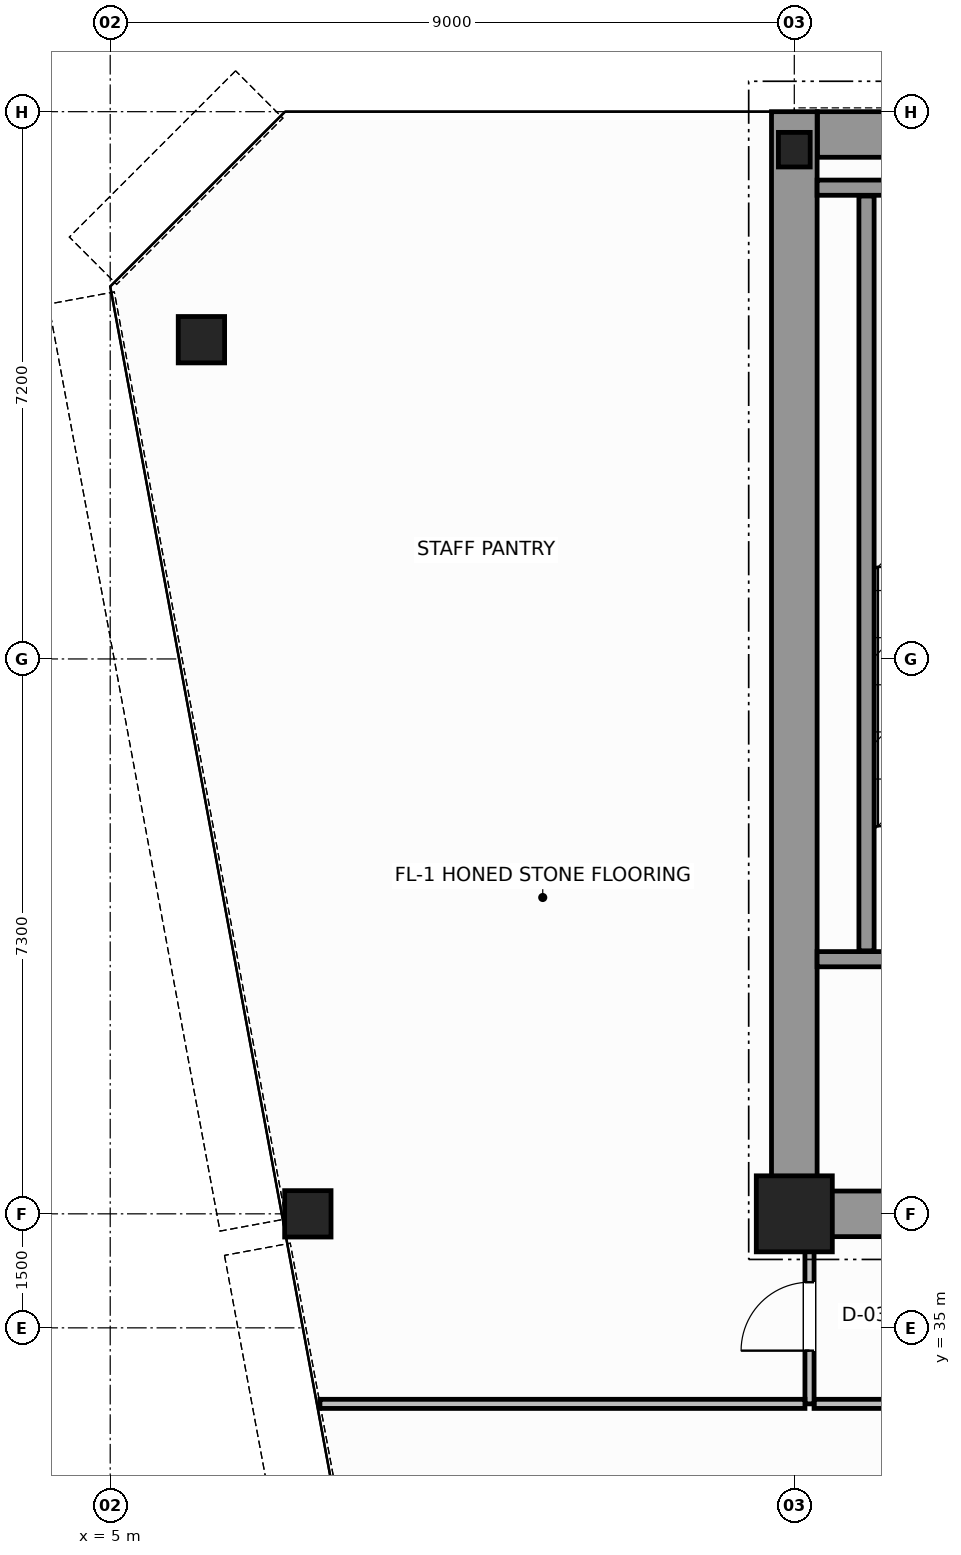
"""IFC4 building model, lengths in metres.
Left out: names, types, materials, properties, quantities, classifications, styles, units other than length and angle.
Written with IfcOpenShell. Run it as: python <this file> out.ifc"""

import sys

from ifc_helpers import new_model, si_unit, direction, frame, frame_2d, origin, origin_2d, place, context, subcontext, project, spatial, rectangle, hollow_circle, i_section, extrude, source, transform, mapped, element, fill, save


model = new_model("IFC4")
c1 = context("Model", 3, precision=1e-05, world=origin(), true_north=direction((0.0, 1.0)))
c2 = subcontext(c1, "Body", "Model", "MODEL_VIEW")
j1 = project(units=[si_unit("LENGTHUNIT", "METRE"), si_unit("PLANEANGLEUNIT", "RADIAN")], contexts=[c1])
p1 = place(None, origin())
s1 = spatial("IfcSite", under=j1, at=p1, CompositionType="ELEMENT")
p2 = place(p1, origin())
s2 = spatial("IfcBuilding", under=s1, at=p2, CompositionType="ELEMENT")
p3 = place(p2, frame((0.0, 0.0, 227.0)))
s3 = spatial("IfcBuildingStorey", under=s2, at=p3, CompositionType="ELEMENT", Elevation=227.0)
m1 = source(origin(), c2, "Body", "SweptSolid", [
    extrude(rectangle(XDim=1.0, YDim=1.0, at=origin_2d()), origin(), (0.0, 0.0, 1.0), 3.8),
])
p4 = place(p3, frame((14.0, 36.5, 0.0), z_axis=(0.0, 0.0, 1.0), x_axis=(1.0, 0.0, 0.0)))
e1 = element("IfcColumn", 1, at=p4, inside=s3, PredefinedType="COLUMN", context=c2, shape_type="MappedRepresentation", body=[
    mapped(m1, transform((0.0, 0.0, 0.0), scale=1.0)),
])
m2 = source(origin(), c2, "Body", "SweptSolid", [
    extrude(i_section(OverallWidth=0.418, OverallDepth=0.455, WebThickness=0.042, FlangeThickness=0.058, FilletRadius=0.015, at=origin_2d()), origin(), (0.0, 0.0, 1.0), 3.8),
])
p5 = place(p3, frame((14.0, 50.5, 0.0), z_axis=(0.0, 0.0, 1.0), x_axis=(1.0, 0.0, 0.0)))
e2 = element("IfcColumn", 2, at=p5, inside=s3, PredefinedType="COLUMN", context=c2, shape_type="MappedRepresentation", body=[
    mapped(m2, transform((0.0, 0.0, 0.0), scale=1.0)),
])
m3 = source(origin(), c2, "Body", "SweptSolid", [
    extrude(hollow_circle(Radius=0.305, WallThickness=0.03, at=origin_2d()), origin(), (0.0, 0.0, 1.0), 3.8),
])
for number, where, z_axis, x_axis in (
    (3, (6.2, 48.0, 0.0), (0.0, 0.0, 1.0), (1.0, 0.0, 0.0)),
    (4, (7.6, 36.5, 0.0), (0.0, 0.0, 1.0), (1.0, 0.0, 0.0)),
):
    element("IfcColumn", number, at=place(p3, frame(where, z_axis=z_axis, x_axis=x_axis)), inside=s3, PredefinedType="COLUMN", context=c2, shape_type="MappedRepresentation", body=[
        mapped(m3, transform((0.0, 0.0, 0.0), scale=1.0)),
    ])
p6 = place(p3, frame((14.304, 50.7, 0.0), z_axis=(0.0, 0.0, 1.0), x_axis=(1.0, 0.0, 0.0)))
e5 = element("IfcWall", 5, at=p6, inside=s3, PredefinedType="SHEAR", context=c2, shape_type="SweptSolid", body=[
    extrude(rectangle(XDim=19.694, YDim=0.6, at=frame_2d((9.847, 0.0))), origin(), (0.0, 0.0, 1.0), 3.8),
])
p7 = place(p3, frame((14.0, 36.5, 0.0), z_axis=(0.0, 0.0, 1.0), x_axis=(0.0, 1.0, 0.0)))
e6 = element("IfcWall", 6, at=p7, inside=s3, PredefinedType="SHEAR", context=c2, shape_type="SweptSolid", body=[
    extrude(rectangle(XDim=14.5, YDim=0.6, at=frame_2d((7.25, 0.0))), origin(), (0.0, 0.0, 1.0), 3.8),
])
p8 = place(p3, frame((14.32, 36.5, 0.0), z_axis=(0.0, 0.0, 1.0), x_axis=(1.0, 0.0, 0.0)))
e7 = element("IfcWall", 7, at=p8, inside=s3, PredefinedType="SHEAR", context=c2, shape_type="SweptSolid", body=[
    extrude(rectangle(XDim=3.88, YDim=0.6, at=frame_2d((1.94, 0.0))), origin(), (0.0, 0.0, 1.0), 2.58),
])
p9 = place(p3, frame((14.3, 39.85, 0.0), z_axis=(0.0, 0.0, 1.0), x_axis=(1.0, 0.0, 0.0)))
e8 = element("IfcWall", 8, at=p9, inside=s3, PredefinedType="SOLIDWALL", context=c2, shape_type="SweptSolid", body=[
    extrude(rectangle(XDim=4.3, YDim=0.2, at=frame_2d((2.15, 0.0))), origin(), (0.0, 0.0, 1.0), 3.8),
])
p10 = place(p9, frame((1.875, 0.0, 0.0)))
e9 = element("IfcOpeningElement", 9, at=p10, cuts=e8, PredefinedType="OPENING", context=c2, shape_type="SweptSolid", body=[
    extrude(rectangle(XDim=1.1, YDim=2.15, at=frame_2d((0.55, 1.075))), frame((0.0, 0.11, 0.0), z_axis=(0.0, -1.0, 0.0), x_axis=(1.0, 0.0, 0.0)), (0.0, 0.0, 1.0), 0.22),
])
p11 = place(p3, frame((14.3, 50.0, 0.0), z_axis=(0.0, 0.0, 1.0), x_axis=(1.0, 0.0, 0.0)))
e10 = element("IfcWall", 10, at=p11, inside=s3, PredefinedType="SOLIDWALL", context=c2, shape_type="SweptSolid", body=[
    extrude(rectangle(XDim=4.3, YDim=0.2, at=frame_2d((2.15, 0.0))), origin(), (0.0, 0.0, 1.0), 3.8),
])
p12 = place(p3, frame((14.95, 39.96, 0.0), z_axis=(0.0, 0.0, 1.0), x_axis=(0.0, 1.0, 0.0)))
e11 = element("IfcWall", 11, at=p12, inside=s3, PredefinedType="SOLIDWALL", context=c2, shape_type="SweptSolid", body=[
    extrude(rectangle(XDim=9.93, YDim=0.2, at=frame_2d((4.965, 0.0))), origin(), (0.0, 0.0, 1.0), 3.8),
])
p13 = place(p3, frame((14.26, 34.0, 0.0), z_axis=(0.0, 0.0, 1.0), x_axis=(1.0, 0.0, 0.0)))
e12 = element("IfcWall", 12, at=p13, inside=s3, PredefinedType="PARTITIONING", context=c2, shape_type="SweptSolid", body=[
    extrude(rectangle(XDim=16.48, YDim=0.12, at=frame_2d((8.24, 0.0))), origin(), (0.0, 0.0, 1.0), 3.58),
])
p14 = place(p3, frame((14.2, 34.0, 0.0), z_axis=(0.0, 0.0, 1.0), x_axis=(0.0, 1.0, 0.0)))
e13 = element("IfcWall", 13, at=p14, inside=s3, PredefinedType="PARTITIONING", context=c2, shape_type="SweptSolid", body=[
    extrude(rectangle(XDim=2.44, YDim=0.12, at=frame_2d((1.22, 0.0))), origin(), (0.0, 0.0, 1.0), 3.58),
])
p15 = place(p14, frame((0.7, 0.0, 0.0)))
e14 = element("IfcOpeningElement", 14, at=p15, cuts=e13, PredefinedType="OPENING", context=c2, shape_type="SweptSolid", body=[
    extrude(rectangle(XDim=0.9, YDim=2.15, at=frame_2d((0.45, 1.075))), frame((0.0, 0.07, 0.0), z_axis=(0.0, -1.0, 0.0), x_axis=(1.0, 0.0, 0.0)), (0.0, 0.0, 1.0), 0.14),
])
p16 = place(p3, frame((7.759, 34.0, 0.0), z_axis=(0.0, 0.0, 1.0), x_axis=(1.0, 0.0, 0.0)))
e15 = element("IfcWall", 15, at=p16, inside=s3, PredefinedType="PARTITIONING", context=c2, shape_type="SweptSolid", body=[
    extrude(rectangle(XDim=6.381, YDim=0.12, at=frame_2d((3.19, 0.0))), origin(), (0.0, 0.0, 1.0), 3.58),
])
m4 = source(origin(), c2, "Body", "SweptSolid", [
    extrude(rectangle(XDim=0.9, YDim=2.15, at=frame_2d((0.45, 1.075))), frame((0.0, 0.025, 0.0), z_axis=(0.0, -1.0, 0.0), x_axis=(1.0, 0.0, 0.0)), (0.0, 0.0, 1.0), 0.05),
])
p17 = place(p15, origin())
e16 = element("IfcDoor", 16, at=p17, inside=s3, OperationType="SINGLE_SWING_LEFT", PredefinedType="DOOR", context=c2, shape_type="MappedRepresentation", body=[
    mapped(m4, transform((0.0, 0.0, 0.0), scale=1.0)),
])
fill(e14, e16)
save(model, sys.argv[1])
